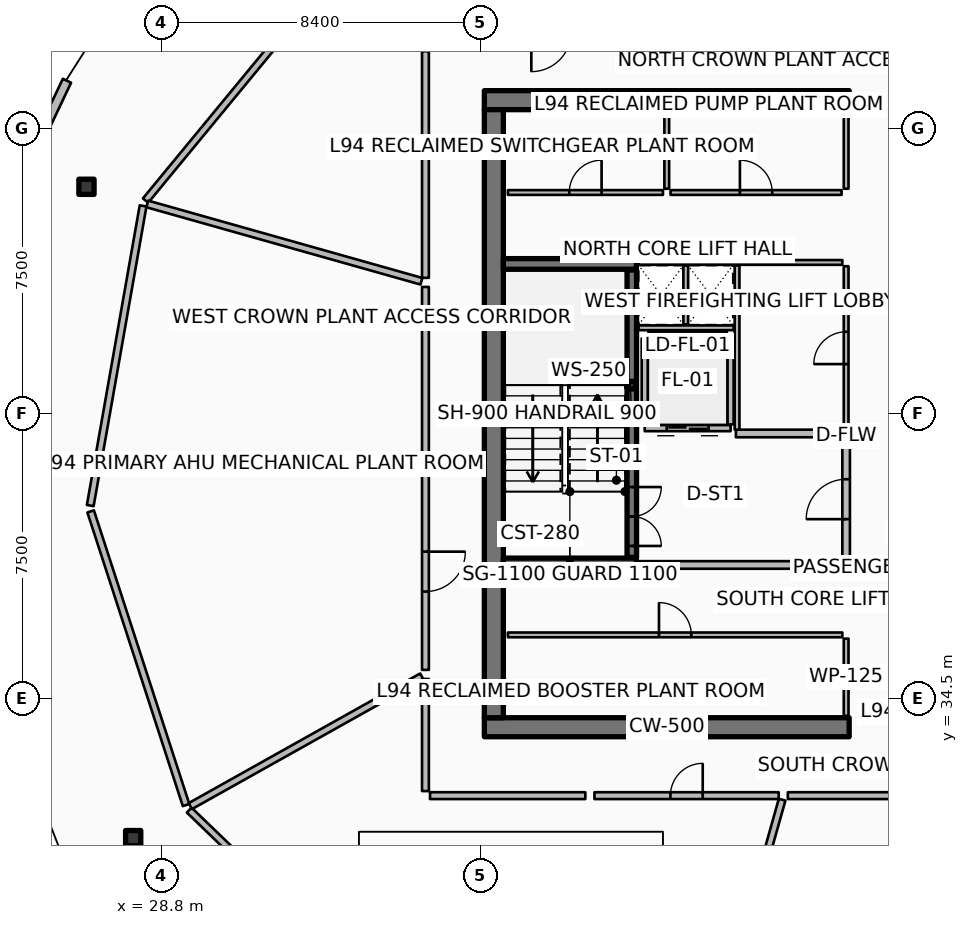
"""IFC4 building model, lengths in metres.
Left out: names, types, materials, properties, quantities, classifications, styles, units other than length and angle.
Written with IfcOpenShell. Run it as: python <this file> out.ifc"""

import sys

from ifc_helpers import new_model, si_unit, direction, frame, frame_2d, origin, origin_2d, place, context, subcontext, project, spatial, rectangle, hollow_rectangle, extrude, element, fill, save


model = new_model("IFC4")
c1 = context("Model", 3, precision=1e-05, world=origin(), true_north=direction((0.0, 1.0)))
c2 = subcontext(c1, "Body", "Model", "MODEL_VIEW")
j1 = project(units=[si_unit("LENGTHUNIT", "METRE"), si_unit("PLANEANGLEUNIT", "RADIAN")], contexts=[c1])
p1 = place(None, origin())
s1 = spatial("IfcSite", under=j1, at=p1, CompositionType="ELEMENT")
p2 = place(p1, origin())
s2 = spatial("IfcBuilding", under=s1, at=p2, CompositionType="ELEMENT")
p3 = place(p2, frame((0.0, 0.0, 374.0)))
s3 = spatial("IfcBuildingStorey", under=s2, at=p3, CompositionType="ELEMENT", Elevation=374.0)
for number, where, z_axis, x_axis in (
    (1, (37.3, 33.75, 0.0), (0.0, 0.0, 1.0), (1.0, 0.0, 0.0)),
    (2, (37.3, 50.25, 0.0), (0.0, 0.0, 1.0), (1.0, 0.0, 0.0)),
):
    element("IfcWall", number, at=place(p3, frame(where, z_axis=z_axis, x_axis=x_axis)), inside=s3, PredefinedType="SHEAR", context=c2, shape_type="SweptSolid", body=[
        extrude(rectangle(XDim=9.6, YDim=0.5, at=frame_2d((4.8, 0.0))), origin(), (0.0, 0.0, 1.0), 3.6),
    ])
p4 = place(p3, frame((37.55, 34.0, 0.0), z_axis=(0.0, 0.0, 1.0), x_axis=(0.0, 1.0, 0.0)))
e3 = element("IfcWall", 3, at=p4, inside=s3, PredefinedType="SHEAR", context=c2, shape_type="SweptSolid", body=[
    extrude(rectangle(XDim=16.0, YDim=0.5, at=frame_2d((8.0, 0.0))), origin(), (0.0, 0.0, 1.0), 3.6),
])
for number, where, z_axis, x_axis in (
    (4, (37.8, 38.06, 0.0), (0.0, 0.0, 1.0), (1.0, 0.0, 0.0)),
    (5, (37.8, 45.94, 0.0), (0.0, 0.0, 1.0), (1.0, 0.0, 0.0)),
):
    element("IfcWall", number, at=place(p3, frame(where, z_axis=z_axis, x_axis=x_axis)), inside=s3, PredefinedType="SHEAR", context=c2, shape_type="SweptSolid", body=[
        extrude(rectangle(XDim=3.5, YDim=0.28, at=frame_2d((1.75, 0.0))), origin(), (0.0, 0.0, 1.0), 3.6),
    ])
p5 = place(p3, frame((41.18, 42.75, 0.0), z_axis=(0.0, 0.0, 1.0), x_axis=(1.0, 0.0, 0.0)))
e6 = element("IfcColumn", 6, at=p5, inside=s3, PredefinedType="COLUMN", context=c2, shape_type="SweptSolid", body=[
    extrude(hollow_rectangle(XDim=0.2, YDim=0.2, WallThickness=0.01, InnerFilletRadius=0.01, OuterFilletRadius=0.02, at=origin_2d()), origin(), (0.0, 0.0, 1.0), 1.595),
])
for number, where, z_axis, x_axis in (
    (7, (26.83, 47.97, 0.0), (0.0, 0.0, 1.0), (1.0, 0.0, 0.0)),
    (8, (28.059, 30.833, 0.0), (0.0, 0.0, 1.0), (1.0, 0.0, 0.0)),
):
    element("IfcColumn", number, at=place(p3, frame(where, z_axis=z_axis, x_axis=x_axis)), inside=s3, PredefinedType="COLUMN", context=c2, shape_type="SweptSolid", body=[
        extrude(hollow_rectangle(XDim=0.4, YDim=0.4, WallThickness=0.02, InnerFilletRadius=0.02, OuterFilletRadius=0.04, at=origin_2d()), origin(), (0.0, 0.0, 1.0), 3.36),
    ])
p6 = place(p3, frame((26.317, 50.761, 0.0), z_axis=(0.0, 0.0, 1.0), x_axis=(-0.4282507592, -0.903659940046, 0.0)))
e9 = element("IfcWall", 9, at=p6, inside=s3, PredefinedType="SOLIDWALL", context=c2, shape_type="SweptSolid", body=[
    extrude(rectangle(XDim=5.042, YDim=0.24, at=frame_2d((2.521, 0.0))), origin(), (0.0, 0.0, 1.0), 2.41),
])
p7 = place(p6, frame((1.821, 0.0, 1.35)))
e10 = element("IfcOpeningElement", 10, at=p7, cuts=e9, PredefinedType="OPENING", context=c2, shape_type="SweptSolid", body=[
    extrude(rectangle(XDim=1.4, YDim=0.75, at=frame_2d((0.7, 0.375))), frame((0.0, 0.13, 0.0), z_axis=(0.0, -1.0, 0.0), x_axis=(1.0, 0.0, 0.0)), (0.0, 0.0, 1.0), 0.26),
])
p8 = place(p3, frame((41.18, 38.22, 0.0), z_axis=(0.0, 0.0, 1.0), x_axis=(0.0, 1.0, 0.0)))
e11 = element("IfcWall", 11, at=p8, inside=s3, PredefinedType="SOLIDWALL", context=c2, shape_type="SweptSolid", body=[
    extrude(rectangle(XDim=7.56, YDim=0.25, at=frame_2d((3.78, 0.0))), origin(), (0.0, 0.0, 1.0), 3.36),
])
p9 = place(p8, frame((0.3, 0.0, 0.0)))
e12 = element("IfcOpeningElement", 12, at=p9, cuts=e11, PredefinedType="OPENING", context=c2, shape_type="SweptSolid", body=[
    extrude(rectangle(XDim=1.55, YDim=2.15, at=frame_2d((0.775, 1.075))), frame((0.0, 0.135, 0.0), z_axis=(0.0, -1.0, 0.0), x_axis=(1.0, 0.0, 0.0)), (0.0, 0.0, 1.0), 0.27),
])
p10 = place(p3, frame((43.78, 41.62, 0.0), z_axis=(0.0, 0.0, 1.0), x_axis=(-1.0, 0.0, 0.0)))
e13 = element("IfcWall", 13, at=p10, inside=s3, PredefinedType="PARTITIONING", context=c2, shape_type="SweptSolid", body=[
    extrude(rectangle(XDim=2.26, YDim=0.16, at=frame_2d((1.13, 0.0))), origin(), (0.0, 0.0, 1.0), 3.36),
])
p11 = place(p10, frame((0.58, 0.0, 0.0)))
e14 = element("IfcOpeningElement", 14, at=p11, cuts=e13, PredefinedType="OPENING", context=c2, shape_type="SweptSolid", body=[
    extrude(rectangle(XDim=1.1, YDim=2.1, at=frame_2d((0.55, 1.05))), frame((0.0, 0.09, 0.0), z_axis=(0.0, -1.0, 0.0), x_axis=(1.0, 0.0, 0.0)), (0.0, 0.0, 1.0), 0.18),
])
for number, where, z_axis, x_axis in (
    (15, (43.78, 41.72, 0.0), (0.0, 0.0, 1.0), (0.0, 1.0, 0.0)),
    (16, (41.52, 41.72, 0.0), (0.0, 0.0, 1.0), (0.0, 1.0, 0.0)),
):
    element("IfcWall", number, at=place(p3, frame(where, z_axis=z_axis, x_axis=x_axis)), inside=s3, PredefinedType="PARTITIONING", context=c2, shape_type="SweptSolid", body=[
        extrude(rectangle(XDim=2.26, YDim=0.16, at=frame_2d((1.13, 0.0))), origin(), (0.0, 0.0, 1.0), 3.36),
    ])
p12 = place(p3, frame((41.62, 44.08, 0.0), z_axis=(0.0, 0.0, 1.0), x_axis=(1.0, 0.0, 0.0)))
e17 = element("IfcWall", 17, at=p12, inside=s3, PredefinedType="PARTITIONING", context=c2, shape_type="SweptSolid", body=[
    extrude(rectangle(XDim=2.06, YDim=0.16, at=frame_2d((1.03, 0.0))), origin(), (0.0, 0.0, 1.0), 3.36),
])
p13 = place(p3, frame((46.82, 34.05, 0.0), z_axis=(0.0, 0.0, 1.0), x_axis=(0.0, 1.0, 0.0)))
e18 = element("IfcWall", 18, at=p13, inside=s3, PredefinedType="PARTITIONING", context=c2, shape_type="SweptSolid", body=[
    extrude(rectangle(XDim=2.03, YDim=0.125, at=frame_2d((1.015, 0.0))), origin(), (0.0, 0.0, 1.0), 2.8),
])
p14 = place(p3, frame((37.92, 36.18, 0.0), z_axis=(0.0, 0.0, 1.0), x_axis=(1.0, 0.0, 0.0)))
e19 = element("IfcWall", 19, at=p14, inside=s3, PredefinedType="PARTITIONING", context=c2, shape_type="SweptSolid", body=[
    extrude(rectangle(XDim=8.8, YDim=0.125, at=frame_2d((4.4, 0.0))), origin(), (0.0, 0.0, 1.0), 2.8),
])
p15 = place(p14, frame((3.975, 0.0, 0.0)))
e20 = element("IfcOpeningElement", 20, at=p15, cuts=e19, PredefinedType="OPENING", context=c2, shape_type="SweptSolid", body=[
    extrude(rectangle(XDim=0.85, YDim=2.06, at=frame_2d((0.425, 1.03))), frame((0.0, 0.073, 0.0), z_axis=(0.0, -1.0, 0.0), x_axis=(1.0, 0.0, 0.0)), (0.0, 0.0, 1.0), 0.145),
])
for number, where, z_axis, x_axis in (
    (21, (46.82, 47.92, 0.0), (0.0, 0.0, 1.0), (0.0, 1.0, 0.0)),
    (22, (42.1, 47.92, 0.0), (0.0, 0.0, 1.0), (0.0, 1.0, 0.0)),
):
    element("IfcWall", number, at=place(p3, frame(where, z_axis=z_axis, x_axis=x_axis)), inside=s3, PredefinedType="PARTITIONING", context=c2, shape_type="SweptSolid", body=[
        extrude(rectangle(XDim=2.03, YDim=0.125, at=frame_2d((1.015, 0.0))), origin(), (0.0, 0.0, 1.0), 2.8),
    ])
p16 = place(p3, frame((37.92, 47.82, 0.0), z_axis=(0.0, 0.0, 1.0), x_axis=(1.0, 0.0, 0.0)))
e23 = element("IfcWall", 23, at=p16, inside=s3, PredefinedType="PARTITIONING", context=c2, shape_type="SweptSolid", body=[
    extrude(rectangle(XDim=4.08, YDim=0.125, at=frame_2d((2.04, 0.0))), origin(), (0.0, 0.0, 1.0), 2.8),
])
p17 = place(p16, frame((1.615, 0.0, 0.0)))
e24 = element("IfcOpeningElement", 24, at=p17, cuts=e23, PredefinedType="OPENING", context=c2, shape_type="SweptSolid", body=[
    extrude(rectangle(XDim=0.85, YDim=2.06, at=frame_2d((0.425, 1.03))), frame((0.0, 0.073, 0.0), z_axis=(0.0, -1.0, 0.0), x_axis=(1.0, 0.0, 0.0)), (0.0, 0.0, 1.0), 0.145),
])
p18 = place(p3, frame((42.2, 47.82, 0.0), z_axis=(0.0, 0.0, 1.0), x_axis=(1.0, 0.0, 0.0)))
e25 = element("IfcWall", 25, at=p18, inside=s3, PredefinedType="PARTITIONING", context=c2, shape_type="SweptSolid", body=[
    extrude(rectangle(XDim=4.5, YDim=0.125, at=frame_2d((2.25, 0.0))), origin(), (0.0, 0.0, 1.0), 2.8),
])
p19 = place(p18, frame((1.825, 0.0, 0.0)))
e26 = element("IfcOpeningElement", 26, at=p19, cuts=e25, PredefinedType="OPENING", context=c2, shape_type="SweptSolid", body=[
    extrude(rectangle(XDim=0.85, YDim=2.06, at=frame_2d((0.425, 1.03))), frame((0.0, 0.073, 0.0), z_axis=(0.0, -1.0, 0.0), x_axis=(1.0, 0.0, 0.0)), (0.0, 0.0, 1.0), 0.145),
])
p20 = place(p3, frame((41.35, 38.02, 0.0), z_axis=(0.0, 0.0, 1.0), x_axis=(1.0, 0.0, 0.0)))
e27 = element("IfcWall", 27, at=p20, inside=s3, PredefinedType="PARTITIONING", context=c2, shape_type="SweptSolid", body=[
    extrude(rectangle(XDim=5.37, YDim=0.2, at=frame_2d((2.685, 0.0))), origin(), (0.0, 0.0, 1.0), 3.36),
])
p21 = place(p3, frame((43.92, 41.48, 0.0), z_axis=(0.0, 0.0, 1.0), x_axis=(1.0, 0.0, 0.0)))
e28 = element("IfcWall", 28, at=p21, inside=s3, PredefinedType="PARTITIONING", context=c2, shape_type="SweptSolid", body=[
    extrude(rectangle(XDim=2.8, YDim=0.2, at=frame_2d((1.4, 0.0))), origin(), (0.0, 0.0, 1.0), 3.36),
])
p22 = place(p3, frame((46.82, 38.12, 0.0), z_axis=(0.0, 0.0, 1.0), x_axis=(0.0, 1.0, 0.0)))
e29 = element("IfcWall", 29, at=p22, inside=s3, PredefinedType="PARTITIONING", context=c2, shape_type="SweptSolid", body=[
    extrude(rectangle(XDim=3.26, YDim=0.2, at=frame_2d((1.63, 0.0))), origin(), (0.0, 0.0, 1.0), 3.36),
])
p23 = place(p22, frame((1.105, 0.0, 0.0)))
e30 = element("IfcOpeningElement", 30, at=p23, cuts=e29, PredefinedType="OPENING", context=c2, shape_type="SweptSolid", body=[
    extrude(rectangle(XDim=1.05, YDim=2.1, at=frame_2d((0.525, 1.05))), frame((0.0, 0.11, 0.0), z_axis=(0.0, -1.0, 0.0), x_axis=(1.0, 0.0, 0.0)), (0.0, 0.0, 1.0), 0.22),
])
p24 = place(p3, frame((41.36, 45.98, 0.0), z_axis=(0.0, 0.0, 1.0), x_axis=(1.0, 0.0, 0.0)))
e31 = element("IfcWall", 31, at=p24, inside=s3, PredefinedType="PARTITIONING", context=c2, shape_type="SweptSolid", body=[
    extrude(rectangle(XDim=5.36, YDim=0.125, at=frame_2d((2.68, 0.0))), origin(), (0.0, 0.0, 1.0), 2.8),
])
p25 = place(p3, frame((41.36, 44.26, 0.0), z_axis=(0.0, 0.0, 1.0), x_axis=(1.0, 0.0, 0.0)))
e32 = element("IfcWall", 32, at=p25, inside=s3, PredefinedType="PARTITIONING", context=c2, shape_type="SweptSolid", body=[
    extrude(rectangle(XDim=2.5, YDim=0.125, at=frame_2d((1.25, 0.0))), origin(), (0.0, 0.0, 1.0), 2.8),
])
p26 = place(p3, frame((42.6, 44.35, 0.0), z_axis=(0.0, 0.0, 1.0), x_axis=(0.0, 1.0, 0.0)))
e33 = element("IfcWall", 33, at=p26, inside=s3, PredefinedType="PARTITIONING", context=c2, shape_type="SweptSolid", body=[
    extrude(rectangle(XDim=1.55, YDim=0.125, at=frame_2d((0.775, 0.0))), origin(), (0.0, 0.0, 1.0), 2.8),
])
p27 = place(p3, frame((43.95, 41.58, 0.0), z_axis=(0.0, 0.0, 1.0), x_axis=(0.0, 1.0, 0.0)))
e34 = element("IfcWall", 34, at=p27, inside=s3, PredefinedType="PARTITIONING", context=c2, shape_type="SweptSolid", body=[
    extrude(rectangle(XDim=4.32, YDim=0.125, at=frame_2d((2.16, 0.0))), origin(), (0.0, 0.0, 1.0), 2.8),
])
p28 = place(p3, frame((46.82, 41.58, 0.0), z_axis=(0.0, 0.0, 1.0), x_axis=(0.0, 1.0, 0.0)))
e35 = element("IfcWall", 35, at=p28, inside=s3, PredefinedType="PARTITIONING", context=c2, shape_type="SweptSolid", body=[
    extrude(rectangle(XDim=4.3, YDim=0.125, at=frame_2d((2.15, 0.0))), origin(), (0.0, 0.0, 1.0), 2.8),
])
p29 = place(p28, frame((1.725, 0.0, 0.0)))
e36 = element("IfcOpeningElement", 36, at=p29, cuts=e35, PredefinedType="OPENING", context=c2, shape_type="SweptSolid", body=[
    extrude(rectangle(XDim=0.85, YDim=2.06, at=frame_2d((0.425, 1.03))), frame((0.0, 0.073, 0.0), z_axis=(0.0, -1.0, 0.0), x_axis=(1.0, 0.0, 0.0)), (0.0, 0.0, 1.0), 0.145),
])
p30 = place(p3, frame((33.258, 53.52, 0.0), z_axis=(0.0, 0.0, 1.0), x_axis=(-0.636018833443, -0.771673534278, 0.0)))
e37 = element("IfcWall", 37, at=p30, inside=s3, PredefinedType="PARTITIONING", context=c2, shape_type="SweptSolid", body=[
    extrude(rectangle(XDim=7.661, YDim=0.18, at=frame_2d((3.831, 0.0))), origin(), (0.0, 0.0, 1.0), 2.8),
])
p31 = place(p3, frame((28.32, 47.468, 0.0), z_axis=(0.0, 0.0, 1.0), x_axis=(-0.173668776466, -0.984804120666, 0.0)))
e38 = element("IfcWall", 38, at=p31, inside=s3, PredefinedType="PARTITIONING", context=c2, shape_type="SweptSolid", body=[
    extrude(rectangle(XDim=8.006, YDim=0.18, at=frame_2d((4.003, 0.0))), origin(), (0.0, 0.0, 1.0), 2.8),
])
p32 = place(p3, frame((26.941, 39.428, 0.0), z_axis=(0.0, 0.0, 1.0), x_axis=(0.309024234991, -0.951054163646, 0.0)))
e39 = element("IfcWall", 39, at=p32, inside=s3, PredefinedType="PARTITIONING", context=c2, shape_type="SweptSolid", body=[
    extrude(rectangle(XDim=8.124, YDim=0.18, at=frame_2d((4.062, 0.0))), origin(), (0.0, 0.0, 1.0), 2.8),
])
p33 = place(p3, frame((29.533, 31.57, 0.0), z_axis=(0.0, 0.0, 1.0), x_axis=(0.719364153135, -0.694633151516, 0.0)))
e40 = element("IfcWall", 40, at=p33, inside=s3, PredefinedType="PARTITIONING", context=c2, shape_type="SweptSolid", body=[
    extrude(rectangle(XDim=8.006, YDim=0.18, at=frame_2d((4.003, 0.0))), origin(), (0.0, 0.0, 1.0), 2.8),
])
p34 = place(p3, frame((35.75, 51.537, 0.0), z_axis=(0.0, 0.0, 1.0), x_axis=(0.0, -1.0, 0.0)))
e41 = element("IfcWall", 41, at=p34, inside=s3, PredefinedType="PARTITIONING", context=c2, shape_type="SweptSolid", body=[
    extrude(rectangle(XDim=5.962, YDim=0.18, at=frame_2d((2.981, 0.0))), origin(), (0.0, 0.0, 1.0), 2.8),
])
p35 = place(p3, frame((35.644, 45.485, 0.0), z_axis=(0.0, 0.0, 1.0), x_axis=(-0.96245862205, 0.271428445159, 0.0)))
e42 = element("IfcWall", 42, at=p35, inside=s3, PredefinedType="PARTITIONING", context=c2, shape_type="SweptSolid", body=[
    extrude(rectangle(XDim=7.495, YDim=0.18, at=frame_2d((3.748, 0.0))), origin(), (0.0, 0.0, 1.0), 2.8),
])
p36 = place(p3, frame((35.75, 45.335, 0.0), z_axis=(0.0, 0.0, 1.0), x_axis=(0.0, -1.0, 0.0)))
e43 = element("IfcWall", 43, at=p36, inside=s3, PredefinedType="PARTITIONING", context=c2, shape_type="SweptSolid", body=[
    extrude(rectangle(XDim=4.665, YDim=0.18, at=frame_2d((2.333, 0.0))), origin(), (0.0, 0.0, 1.0), 2.8),
])
p37 = place(p3, frame((35.75, 40.43, 0.0), z_axis=(0.0, 0.0, 1.0), x_axis=(0.0, -1.0, 0.0)))
e44 = element("IfcWall", 44, at=p37, inside=s3, PredefinedType="PARTITIONING", context=c2, shape_type="SweptSolid", body=[
    extrude(rectangle(XDim=5.17, YDim=0.18, at=frame_2d((2.585, 0.0))), origin(), (0.0, 0.0, 1.0), 2.8),
])
p38 = place(p37, frame((2.06, 0.0, 0.0)))
e45 = element("IfcOpeningElement", 45, at=p38, cuts=e44, PredefinedType="OPENING", context=c2, shape_type="SweptSolid", body=[
    extrude(rectangle(XDim=1.05, YDim=2.1, at=frame_2d((0.525, 1.05))), frame((0.0, 0.1, 0.0), z_axis=(0.0, -1.0, 0.0), x_axis=(1.0, 0.0, 0.0)), (0.0, 0.0, 1.0), 0.2),
])
p39 = place(p3, frame((35.654, 35.086, 0.0), z_axis=(0.0, 0.0, 1.0), x_axis=(-0.872497667023, -0.488618277432, 0.0)))
e46 = element("IfcWall", 46, at=p39, inside=s3, PredefinedType="PARTITIONING", context=c2, shape_type="SweptSolid", body=[
    extrude(rectangle(XDim=6.981, YDim=0.18, at=frame_2d((3.491, 0.0))), origin(), (0.0, 0.0, 1.0), 2.8),
])
p40 = place(p3, frame((35.75, 35.02, 0.0), z_axis=(0.0, 0.0, 1.0), x_axis=(0.0, -1.0, 0.0)))
e47 = element("IfcWall", 47, at=p40, inside=s3, PredefinedType="PARTITIONING", context=c2, shape_type="SweptSolid", body=[
    extrude(rectangle(XDim=2.95, YDim=0.18, at=frame_2d((1.475, 0.0))), origin(), (0.0, 0.0, 1.0), 2.8),
])
p41 = place(p3, frame((35.87, 31.95, 0.0), z_axis=(0.0, 0.0, 1.0), x_axis=(1.0, 0.0, 0.0)))
e48 = element("IfcWall", 48, at=p41, inside=s3, PredefinedType="PARTITIONING", context=c2, shape_type="SweptSolid", body=[
    extrude(rectangle(XDim=4.087, YDim=0.18, at=frame_2d((2.043, 0.0))), origin(), (0.0, 0.0, 1.0), 2.8),
])
p42 = place(p3, frame((40.197, 31.95, 0.0), z_axis=(0.0, 0.0, 1.0), x_axis=(1.0, 0.0, 0.0)))
e49 = element("IfcWall", 49, at=p42, inside=s3, PredefinedType="PARTITIONING", context=c2, shape_type="SweptSolid", body=[
    extrude(rectangle(XDim=4.848, YDim=0.18, at=frame_2d((2.424, 0.0))), origin(), (0.0, 0.0, 1.0), 2.8),
])
p43 = place(p42, frame((1.999, 0.0, 0.0)))
e50 = element("IfcOpeningElement", 50, at=p43, cuts=e49, PredefinedType="OPENING", context=c2, shape_type="SweptSolid", body=[
    extrude(rectangle(XDim=0.85, YDim=2.06, at=frame_2d((0.425, 1.03))), frame((0.0, 0.1, 0.0), z_axis=(0.0, -1.0, 0.0), x_axis=(1.0, 0.0, 0.0)), (0.0, 0.0, 1.0), 0.2),
])
p44 = place(p3, frame((45.136, 31.844, 0.0), z_axis=(0.0, 0.0, 1.0), x_axis=(-0.271457285698, -0.962450488099, 0.0)))
e51 = element("IfcWall", 51, at=p44, inside=s3, PredefinedType="PARTITIONING", context=c2, shape_type="SweptSolid", body=[
    extrude(rectangle(XDim=8.056, YDim=0.18, at=frame_2d((4.028, 0.0))), origin(), (0.0, 0.0, 1.0), 2.8),
])
p45 = place(p3, frame((45.286, 31.95, 0.0), z_axis=(0.0, 0.0, 1.0), x_axis=(1.0, 0.0, 0.0)))
e52 = element("IfcWall", 52, at=p45, inside=s3, PredefinedType="PARTITIONING", context=c2, shape_type="SweptSolid", body=[
    extrude(rectangle(XDim=3.784, YDim=0.18, at=frame_2d((1.892, 0.0))), origin(), (0.0, 0.0, 1.0), 2.8),
])
p46 = place(p9, origin())
e53 = element("IfcDoor", 53, at=p46, inside=s3, OperationType="DOUBLE_DOOR_SINGLE_SWING", PredefinedType="DOOR", context=c2, shape_type="SweptSolid", body=[
    extrude(rectangle(XDim=1.55, YDim=2.15, at=frame_2d((0.775, 1.075))), frame((0.0, 0.025, 0.0), z_axis=(0.0, -1.0, 0.0), x_axis=(1.0, 0.0, 0.0)), (0.0, 0.0, 1.0), 0.05),
])
fill(e12, e53)
p47 = place(p11, origin())
e54 = element("IfcDoor", 54, at=p47, inside=s3, OperationType="DOUBLE_DOOR_SLIDING", PredefinedType="DOOR", context=c2, shape_type="SweptSolid", body=[
    extrude(rectangle(XDim=1.1, YDim=2.1, at=frame_2d((0.55, 1.05))), frame((0.0, 0.025, 0.0), z_axis=(0.0, -1.0, 0.0), x_axis=(1.0, 0.0, 0.0)), (0.0, 0.0, 1.0), 0.05),
])
fill(e14, e54)
p48 = place(p15, origin())
e55 = element("IfcDoor", 55, at=p48, inside=s3, OperationType="SINGLE_SWING_LEFT", PredefinedType="DOOR", context=c2, shape_type="SweptSolid", body=[
    extrude(rectangle(XDim=0.85, YDim=2.06, at=frame_2d((0.425, 1.03))), frame((0.0, 0.025, 0.0), z_axis=(0.0, -1.0, 0.0), x_axis=(1.0, 0.0, 0.0)), (0.0, 0.0, 1.0), 0.05),
])
fill(e20, e55)
p49 = place(p17, origin())
e56 = element("IfcDoor", 56, at=p49, inside=s3, OperationType="SINGLE_SWING_RIGHT", PredefinedType="DOOR", context=c2, shape_type="SweptSolid", body=[
    extrude(rectangle(XDim=0.85, YDim=2.06, at=frame_2d((0.425, 1.03))), frame((0.0, 0.025, 0.0), z_axis=(0.0, -1.0, 0.0), x_axis=(1.0, 0.0, 0.0)), (0.0, 0.0, 1.0), 0.05),
])
fill(e24, e56)
p50 = place(p19, origin())
e57 = element("IfcDoor", 57, at=p50, inside=s3, OperationType="SINGLE_SWING_LEFT", PredefinedType="DOOR", context=c2, shape_type="SweptSolid", body=[
    extrude(rectangle(XDim=0.85, YDim=2.06, at=frame_2d((0.425, 1.03))), frame((0.0, 0.025, 0.0), z_axis=(0.0, -1.0, 0.0), x_axis=(1.0, 0.0, 0.0)), (0.0, 0.0, 1.0), 0.05),
])
fill(e26, e57)
p51 = place(p23, origin())
e58 = element("IfcDoor", 58, at=p51, inside=s3, OperationType="SINGLE_SWING_LEFT", PredefinedType="DOOR", context=c2, shape_type="SweptSolid", body=[
    extrude(rectangle(XDim=1.05, YDim=2.1, at=frame_2d((0.525, 1.05))), frame((0.0, 0.025, 0.0), z_axis=(0.0, -1.0, 0.0), x_axis=(1.0, 0.0, 0.0)), (0.0, 0.0, 1.0), 0.05),
])
fill(e30, e58)
p52 = place(p29, origin())
e59 = element("IfcDoor", 59, at=p52, inside=s3, OperationType="SINGLE_SWING_LEFT", PredefinedType="DOOR", context=c2, shape_type="SweptSolid", body=[
    extrude(rectangle(XDim=0.85, YDim=2.06, at=frame_2d((0.425, 1.03))), frame((0.0, 0.025, 0.0), z_axis=(0.0, -1.0, 0.0), x_axis=(1.0, 0.0, 0.0)), (0.0, 0.0, 1.0), 0.05),
])
fill(e36, e59)
p53 = place(p38, origin())
e60 = element("IfcDoor", 60, at=p53, inside=s3, OperationType="SINGLE_SWING_LEFT", PredefinedType="DOOR", context=c2, shape_type="SweptSolid", body=[
    extrude(rectangle(XDim=1.05, YDim=2.1, at=frame_2d((0.525, 1.05))), frame((0.0, 0.025, 0.0), z_axis=(0.0, -1.0, 0.0), x_axis=(1.0, 0.0, 0.0)), (0.0, 0.0, 1.0), 0.05),
])
fill(e45, e60)
p54 = place(p43, origin())
e61 = element("IfcDoor", 61, at=p54, inside=s3, OperationType="SINGLE_SWING_RIGHT", PredefinedType="DOOR", context=c2, shape_type="SweptSolid", body=[
    extrude(rectangle(XDim=0.85, YDim=2.06, at=frame_2d((0.425, 1.03))), frame((0.0, 0.025, 0.0), z_axis=(0.0, -1.0, 0.0), x_axis=(1.0, 0.0, 0.0)), (0.0, 0.0, 1.0), 0.05),
])
fill(e50, e61)
save(model, sys.argv[1])
